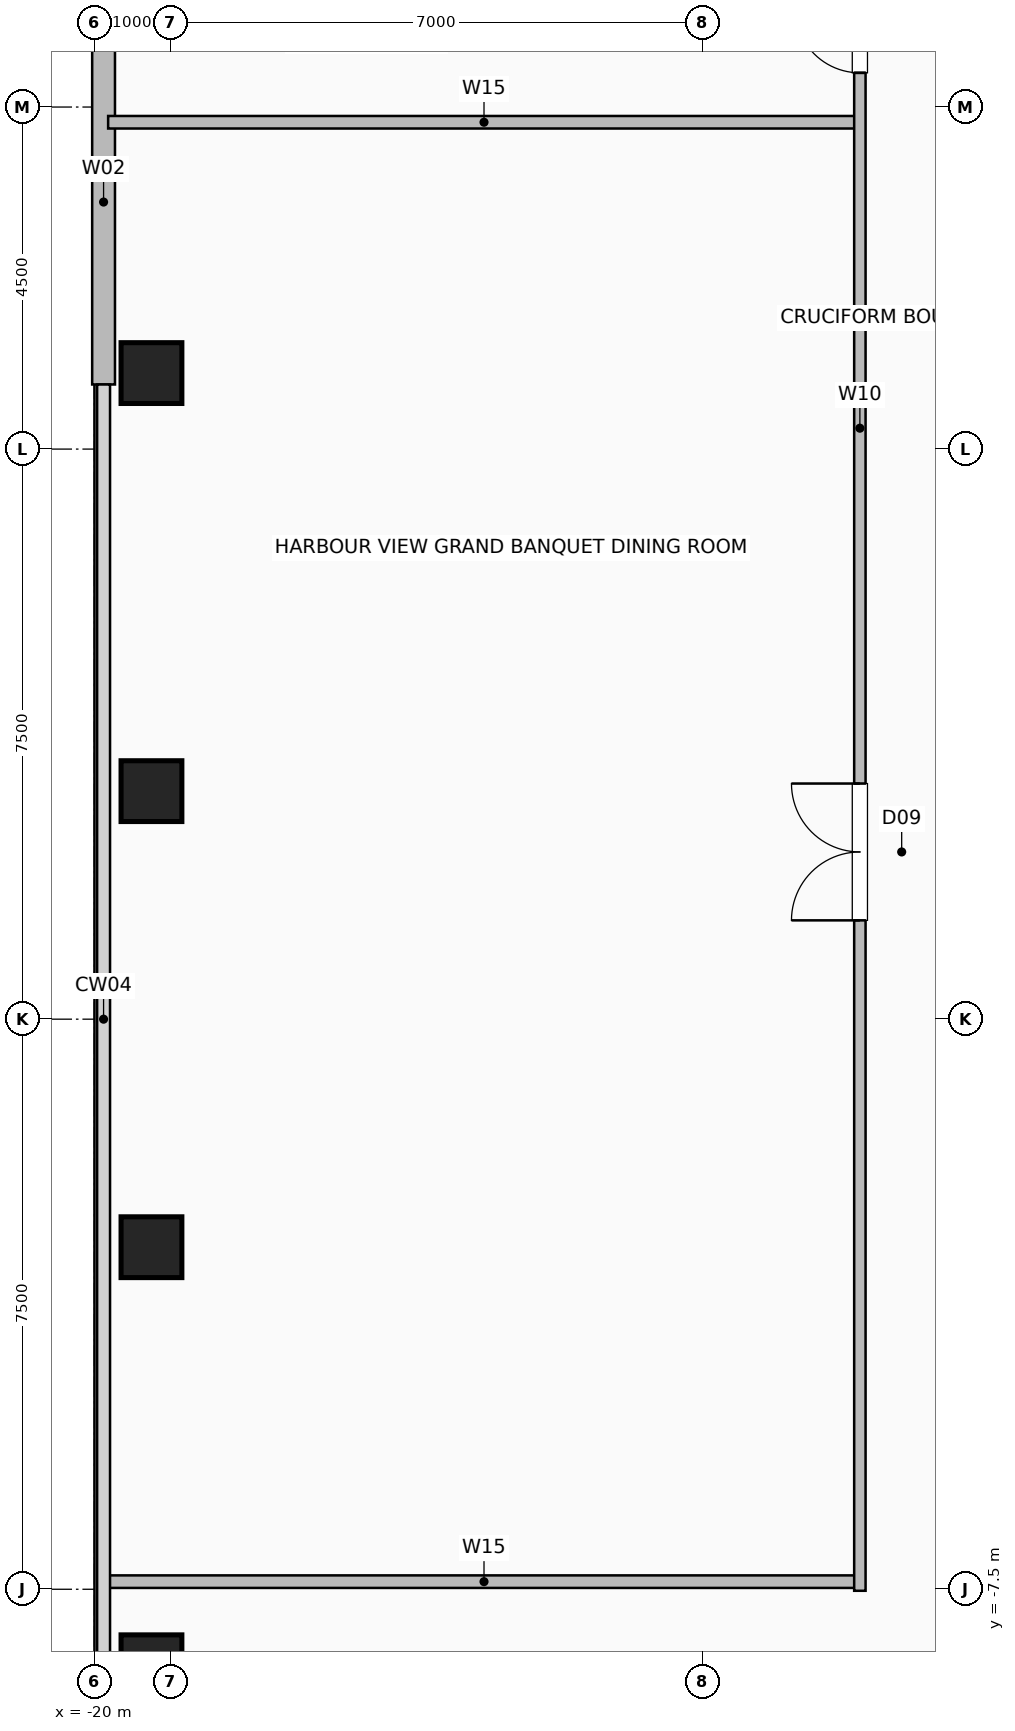
"""IFC4 building model, lengths in metres.
Left out: names, types, materials, properties, quantities, classifications, styles, units other than length and angle.
Written with IfcOpenShell. Run it as: python <this file> out.ifc"""

import sys

from ifc_helpers import new_model, si_unit, direction, frame, frame_2d, origin, origin_2d, place, context, subcontext, project, spatial, rectangle, hollow_rectangle, extrude, element, fill, save


model = new_model("IFC4")
c1 = context("Model", 3, precision=1e-05, world=origin(), true_north=direction((0.0, 1.0)))
c2 = subcontext(c1, "Body", "Model", "MODEL_VIEW")
j1 = project(units=[si_unit("LENGTHUNIT", "METRE"), si_unit("PLANEANGLEUNIT", "RADIAN")], contexts=[c1])
p1 = place(None, origin())
s1 = spatial("IfcSite", under=j1, at=p1, CompositionType="ELEMENT")
p2 = place(p1, origin())
s2 = spatial("IfcBuilding", under=s1, at=p2, CompositionType="ELEMENT")
p3 = place(p2, frame((0.0, 0.0, 191.4)))
s3 = spatial("IfcBuildingStorey", under=s2, at=p3, CompositionType="ELEMENT", Elevation=191.4)
for number, where, z_axis, x_axis in (
    (1, (-19.25, -8.5, 0.0), (0.0, 0.0, 1.0), (1.0, 0.0, 0.0)),
    (2, (-19.25, -3.0, 0.0), (0.0, 0.0, 1.0), (1.0, 0.0, 0.0)),
    (3, (-19.25, 3.0, 0.0), (0.0, 0.0, 1.0), (1.0, 0.0, 0.0)),
    (4, (-19.25, 8.5, 0.0), (0.0, 0.0, 1.0), (1.0, 0.0, 0.0)),
):
    element("IfcColumn", number, at=place(p3, frame(where, z_axis=z_axis, x_axis=x_axis)), inside=s3, PredefinedType="COLUMN", context=c2, shape_type="SweptSolid", body=[
        extrude(hollow_rectangle(XDim=0.8, YDim=0.8, WallThickness=0.04, at=origin_2d()), origin(), (0.0, 0.0, 1.0), 3.6),
    ])
p4 = place(p3, frame((-19.88, 8.35, 0.0), z_axis=(0.0, 0.0, 1.0), x_axis=(0.0, 1.0, 0.0)))
e5 = element("IfcWall", 5, at=p4, inside=s3, PredefinedType="SOLIDWALL", context=c2, shape_type="SweptSolid", body=[
    extrude(rectangle(XDim=4.8, YDim=0.3, at=frame_2d((2.4, 0.0))), origin(), (0.0, 0.0, 1.0), 3.36),
])
for number, where, z_axis, x_axis in (
    (6, (-19.82, -7.4, 0.0), (0.0, 0.0, 1.0), (1.0, 0.0, 0.0)),
    (7, (-19.82, 11.8, 0.0), (0.0, 0.0, 1.0), (1.0, 0.0, 0.0)),
):
    element("IfcWall", number, at=place(p3, frame(where, z_axis=z_axis, x_axis=x_axis)), inside=s3, PredefinedType="PLUMBINGWALL", context=c2, shape_type="SweptSolid", body=[
        extrude(rectangle(XDim=9.89, YDim=0.165, at=frame_2d((4.945, 0.0))), origin(), (0.0, 0.0, 1.0), 3.36),
    ])
p5 = place(p3, frame((-9.93, -7.52, 0.0), z_axis=(0.0, 0.0, 1.0), x_axis=(0.0, 1.0, 0.0)))
e8 = element("IfcWall", 8, at=p5, inside=s3, PredefinedType="PARTITIONING", context=c2, shape_type="SweptSolid", body=[
    extrude(rectangle(XDim=21.59, YDim=0.15, at=frame_2d((10.795, 0.0))), origin(), (0.0, 0.0, 1.0), 3.36),
])
p6 = place(p5, frame((8.82, 0.0, 0.0)))
e9 = element("IfcOpeningElement", 9, at=p6, cuts=e8, PredefinedType="OPENING", context=c2, shape_type="SweptSolid", body=[
    extrude(rectangle(XDim=1.8, YDim=2.08, at=frame_2d((0.9, 1.04))), frame((0.0, 0.085, 0.0), z_axis=(0.0, -1.0, 0.0), x_axis=(1.0, 0.0, 0.0)), (0.0, 0.0, 1.0), 0.17),
])
p7 = place(p5, frame((19.97, 0.0, 0.0)))
e10 = element("IfcOpeningElement", 10, at=p7, cuts=e8, PredefinedType="OPENING", context=c2, shape_type="SweptSolid", body=[
    extrude(rectangle(XDim=0.85, YDim=2.05, at=frame_2d((0.425, 1.025))), frame((0.0, 0.085, 0.0), z_axis=(0.0, -1.0, 0.0), x_axis=(1.0, 0.0, 0.0)), (0.0, 0.0, 1.0), 0.17),
])
p8 = place(p6, origin())
e11 = element("IfcDoor", 11, at=p8, inside=s3, OperationType="DOUBLE_DOOR_SINGLE_SWING", PredefinedType="DOOR", context=c2, shape_type="SweptSolid", body=[
    extrude(rectangle(XDim=1.8, YDim=2.08, at=frame_2d((0.9, 1.04))), frame((0.0, 0.025, 0.0), z_axis=(0.0, -1.0, 0.0), x_axis=(1.0, 0.0, 0.0)), (0.0, 0.0, 1.0), 0.05),
])
fill(e9, e11)
p9 = place(p7, origin())
e12 = element("IfcDoor", 12, at=p9, inside=s3, OperationType="SINGLE_SWING_RIGHT", PredefinedType="DOOR", context=c2, shape_type="SweptSolid", body=[
    extrude(rectangle(XDim=0.85, YDim=2.05, at=frame_2d((0.425, 1.025))), frame((0.0, 0.025, 0.0), z_axis=(0.0, -1.0, 0.0), x_axis=(1.0, 0.0, 0.0)), (0.0, 0.0, 1.0), 0.05),
])
fill(e10, e12)
save(model, sys.argv[1])
